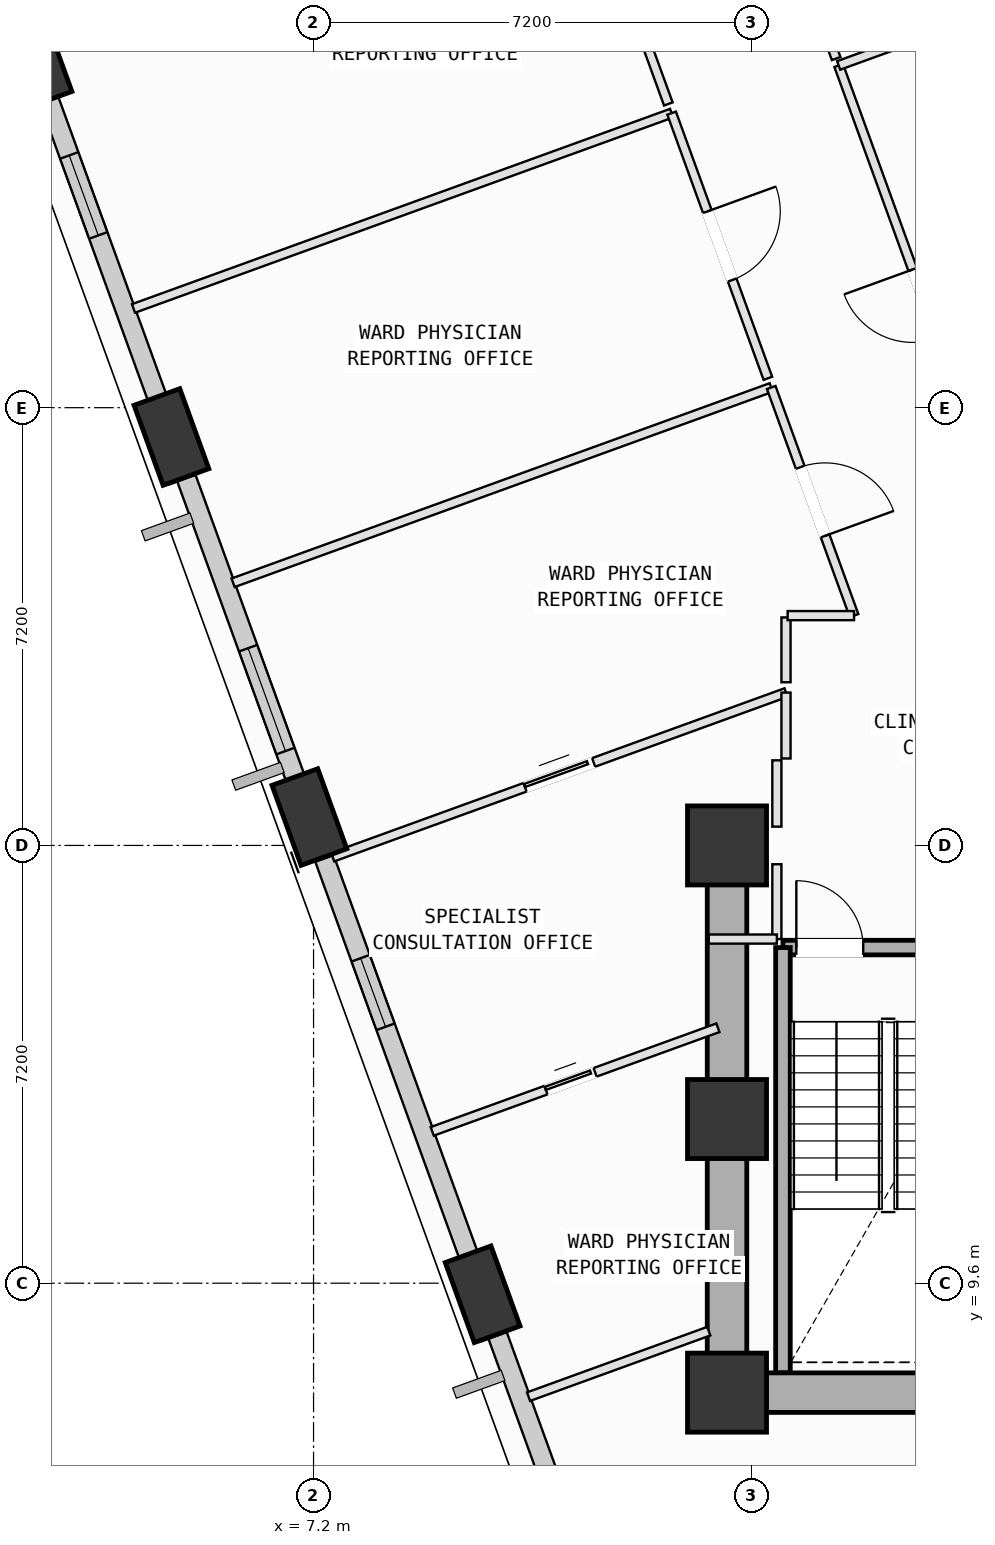
"""IFC4 building model, lengths in metres.
Left out: names, types, materials, properties, quantities, classifications, styles, units other than length and angle.
Written with IfcOpenShell. Run it as: python <this file> out.ifc"""

import sys

from ifc_helpers import new_model, si_unit, direction, frame, frame_2d, origin, origin_2d, place, context, subcontext, project, spatial, rectangle, extrude, element, fill, save


model = new_model("IFC4")
c1 = context("Model", 3, precision=1e-05, world=origin(), true_north=direction((0.0, 1.0)))
c2 = subcontext(c1, "Body", "Model", "MODEL_VIEW")
j1 = project(units=[si_unit("LENGTHUNIT", "METRE"), si_unit("PLANEANGLEUNIT", "RADIAN")], contexts=[c1])
p1 = place(None, origin())
s1 = spatial("IfcSite", under=j1, at=p1, CompositionType="ELEMENT")
p2 = place(p1, origin())
s2 = spatial("IfcBuilding", under=s1, at=p2, CompositionType="ELEMENT")
p3 = place(p2, frame((0.0, 0.0, 108.4)))
s3 = spatial("IfcBuildingStorey", under=s2, at=p3, CompositionType="ELEMENT", Elevation=108.4)
for number, where, z_axis, x_axis in (
    (1, (14.0, 7.8, 0.0), (0.0, 0.0, 1.0), (1.0, 0.0, 0.0)),
    (2, (14.0, 12.3, 0.0), (0.0, 0.0, 1.0), (1.0, 0.0, 0.0)),
    (3, (14.0, 16.8, 0.0), (0.0, 0.0, 1.0), (1.0, 0.0, 0.0)),
):
    element("IfcColumn", number, at=place(p3, frame(where, z_axis=z_axis, x_axis=x_axis)), inside=s3, PredefinedType="COLUMN", context=c2, shape_type="SweptSolid", body=[
        extrude(rectangle(XDim=1.3, YDim=1.3, at=origin_2d()), origin(), (0.0, 0.0, 1.0), 4.0),
    ])
p4 = place(p3, frame((2.611, 29.722, 0.002), z_axis=(-0.019204163449, -0.127522915018, 0.991649689281), x_axis=(-0.198586028496, 0.972557875578, 0.12122197795)))
e4 = element("IfcColumn", 4, at=p4, inside=s3, PredefinedType="COLUMN", context=c2, shape_type="SweptSolid", body=[
    extrude(rectangle(XDim=1.4, YDim=0.8, at=origin_2d()), origin(), (0.0, 0.0, 1.0), 4.03),
])
p5 = place(p3, frame((4.863, 23.518, 0.002), z_axis=(0.006248125651, -0.11822909605, 0.992966687142), x_axis=(-0.389982649693, 0.914072325457, 0.111289338092)))
e5 = element("IfcColumn", 5, at=p5, inside=s3, PredefinedType="COLUMN", context=c2, shape_type="SweptSolid", body=[
    extrude(rectangle(XDim=1.4, YDim=0.8, at=origin_2d()), origin(), (0.0, 0.0, 1.0), 4.025),
])
p6 = place(p3, frame((7.132, 17.267, 0.002), z_axis=(0.031926781496, -0.108769567377, 0.993554156469), x_axis=(-0.590424509034, 0.800027962606, 0.106555892281)))
e6 = element("IfcColumn", 6, at=p6, inside=s3, PredefinedType="COLUMN", context=c2, shape_type="SweptSolid", body=[
    extrude(rectangle(XDim=1.4, YDim=0.8, at=origin_2d()), origin(), (0.0, 0.0, 1.0), 4.022),
])
p7 = place(p3, frame((9.981, 9.418, 0.002), z_axis=(0.064136950794, -0.096721191642, 0.993242902129), x_axis=(-0.800334435141, 0.589545780228, 0.109089710528)))
e7 = element("IfcColumn", 7, at=p7, inside=s3, PredefinedType="COLUMN", context=c2, shape_type="SweptSolid", body=[
    extrude(rectangle(XDim=1.4, YDim=0.8, at=origin_2d()), origin(), (0.0, 0.0, 1.0), 4.023),
])
p8 = place(p3, frame((4.773, 23.765, 0.0), z_axis=(0.0, 0.0, 1.0), x_axis=(-0.341234474443, 0.93997820903, 0.0)))
e8 = element("IfcWall", 8, at=p8, inside=s3, PredefinedType="SOLIDWALL", context=c2, shape_type="SweptSolid", body=[
    extrude(rectangle(XDim=5.628, YDim=0.32, at=frame_2d((2.814, 0.0))), origin(), (0.0, 0.0, 1.0), 3.165),
])
p9 = place(p8, frame((3.263, 0.0, 0.75)))
e9 = element("IfcOpeningElement", 9, at=p9, cuts=e8, PredefinedType="OPENING", context=c2, shape_type="SweptSolid", body=[
    extrude(rectangle(XDim=1.4, YDim=1.85, at=frame_2d((0.7, 0.925))), frame((0.0, 0.17, 0.0), z_axis=(0.0, -1.0, 0.0), x_axis=(1.0, 0.0, 0.0)), (0.0, 0.0, 1.0), 0.34),
])
p10 = place(p3, frame((7.04, 17.519, 0.0), z_axis=(0.0, 0.0, 1.0), x_axis=(-0.341185627891, 0.939995940055, 0.0)))
e10 = element("IfcWall", 10, at=p10, inside=s3, PredefinedType="SOLIDWALL", context=c2, shape_type="SweptSolid", body=[
    extrude(rectangle(XDim=5.662, YDim=0.32, at=frame_2d((2.831, 0.0))), origin(), (0.0, 0.0, 1.0), 3.165),
])
p11 = place(p10, frame((0.886, 0.0, 0.75)))
e11 = element("IfcOpeningElement", 11, at=p11, cuts=e10, PredefinedType="OPENING", context=c2, shape_type="SweptSolid", body=[
    extrude(rectangle(XDim=1.8, YDim=2.05, at=frame_2d((0.9, 1.025))), frame((0.0, 0.17, 0.0), z_axis=(0.0, -1.0, 0.0), x_axis=(1.0, 0.0, 0.0)), (0.0, 0.0, 1.0), 0.34),
])
p12 = place(p3, frame((9.89, 9.668, 0.0), z_axis=(0.0, 0.0, 1.0), x_axis=(-0.341183717547, 0.939996633441, 0.0)))
e12 = element("IfcWall", 12, at=p12, inside=s3, PredefinedType="SOLIDWALL", context=c2, shape_type="SweptSolid", body=[
    extrude(rectangle(XDim=7.36, YDim=0.32, at=frame_2d((3.68, 0.0))), origin(), (0.0, 0.0, 1.0), 3.165),
])
p13 = place(p12, frame((4.414, 0.0, 0.75)))
e13 = element("IfcOpeningElement", 13, at=p13, cuts=e12, PredefinedType="OPENING", context=c2, shape_type="SweptSolid", body=[
    extrude(rectangle(XDim=1.2, YDim=1.75, at=frame_2d((0.6, 0.875))), frame((0.0, 0.17, 0.0), z_axis=(0.0, -1.0, 0.0), x_axis=(1.0, 0.0, 0.0)), (0.0, 0.0, 1.0), 0.34),
])
p14 = place(p3, frame((12.35, 2.891, 0.0), z_axis=(0.0, 0.0, 1.0), x_axis=(-0.341172894035, 0.940000561902, 0.0)))
e14 = element("IfcWall", 14, at=p14, inside=s3, PredefinedType="SOLIDWALL", context=c2, shape_type="SweptSolid", body=[
    extrude(rectangle(XDim=6.223, YDim=0.32, at=frame_2d((3.112, 0.0))), origin(), (0.0, 0.0, 1.0), 3.165),
])
p15 = place(p14, frame((1.65, 0.0, 0.75)))
e15 = element("IfcOpeningElement", 15, at=p15, cuts=e14, PredefinedType="OPENING", context=c2, shape_type="SweptSolid", body=[
    extrude(rectangle(XDim=1.6, YDim=1.95, at=frame_2d((0.8, 0.975))), frame((0.0, 0.17, 0.0), z_axis=(0.0, -1.0, 0.0), x_axis=(1.0, 0.0, 0.0)), (0.0, 0.0, 1.0), 0.34),
])
p16 = place(p3, frame((14.92, 15.12, 0.0), z_axis=(0.0, 0.0, 1.0), x_axis=(1.0, 0.0, 0.0)))
e16 = element("IfcWall", 16, at=p16, inside=s3, PredefinedType="SOLIDWALL", context=c2, shape_type="SweptSolid", body=[
    extrude(rectangle(XDim=3.46, YDim=0.24, at=frame_2d((1.73, 0.0))), origin(), (0.0, 0.0, 1.0), 3.78),
])
p17 = place(p16, frame((0.22, 0.0, 0.0)))
e17 = element("IfcOpeningElement", 17, at=p17, cuts=e16, PredefinedType="OPENING", context=c2, shape_type="SweptSolid", body=[
    extrude(rectangle(XDim=1.1, YDim=2.15, at=frame_2d((0.55, 1.075))), frame((0.0, 0.13, 0.0), z_axis=(0.0, -1.0, 0.0), x_axis=(1.0, 0.0, 0.0)), (0.0, 0.0, 1.0), 0.26),
])
p18 = place(p3, frame((14.92, 8.125, 0.0), z_axis=(0.0, 0.0, 1.0), x_axis=(0.0, 1.0, 0.0)))
e18 = element("IfcWall", 18, at=p18, inside=s3, PredefinedType="SOLIDWALL", context=c2, shape_type="SweptSolid", body=[
    extrude(rectangle(XDim=6.995, YDim=0.24, at=frame_2d((3.498, 0.0))), origin(), (0.0, 0.0, 1.0), 3.78),
])
p19 = place(p3, frame((14.0, 7.8, 0.0), z_axis=(0.0, 0.0, 1.0), x_axis=(1.0, 0.0, 0.0)))
e19 = element("IfcWall", 19, at=p19, inside=s3, PredefinedType="SHEAR", context=c2, shape_type="SweptSolid", body=[
    extrude(rectangle(XDim=10.8, YDim=0.65, at=frame_2d((5.4, 0.0))), origin(), (0.0, 0.0, 1.0), 3.78),
])
p20 = place(p3, frame((14.0, 16.8, 0.0), z_axis=(0.0, 0.0, 1.0), x_axis=(0.0, -1.0, 0.0)))
e20 = element("IfcWall", 20, at=p20, inside=s3, PredefinedType="SHEAR", context=c2, shape_type="SweptSolid", body=[
    extrude(rectangle(XDim=9.0, YDim=0.65, at=frame_2d((4.5, 0.0))), origin(), (0.0, 0.0, 1.0), 3.78),
])
p21 = place(p3, frame((10.011, 8.663, 0.0), z_axis=(0.0, 0.0, 1.0), x_axis=(-0.341584064238, 0.939851226024, 0.0)))
e21 = element("IfcWall", 21, at=p21, inside=s3, PredefinedType="PARTITIONING", context=c2, shape_type="SweptSolid", body=[
    extrude(rectangle(XDim=0.986, YDim=0.15, at=frame_2d((0.493, 0.0))), origin(), (0.0, 0.0, 1.0), 3.165),
])
p22 = place(p3, frame((9.152, 12.097, 0.0), z_axis=(0.0, 0.0, 1.0), x_axis=(0.940066980514, 0.340989841708, 0.0)))
e22 = element("IfcWall", 22, at=p22, inside=s3, PredefinedType="PARTITIONING", context=c2, shape_type="SweptSolid", body=[
    extrude(rectangle(XDim=4.998, YDim=0.15, at=frame_2d((2.499, 0.0))), origin(), (0.0, 0.0, 1.0), 3.78),
])
p23 = place(p22, frame((1.989, 0.0, 0.0)))
e23 = element("IfcOpeningElement", 23, at=p23, cuts=e22, PredefinedType="OPENING", context=c2, shape_type="SweptSolid", body=[
    extrude(rectangle(XDim=0.86, YDim=2.06, at=frame_2d((0.43, 1.03))), frame((0.0, 0.085, 0.0), z_axis=(0.0, -1.0, 0.0), x_axis=(1.0, 0.0, 0.0)), (0.0, 0.0, 1.0), 0.17),
])
p24 = place(p3, frame((13.7, 8.811, 0.0), z_axis=(0.0, 0.0, 1.0), x_axis=(-0.939856698146, -0.341569007596, 0.0)))
e24 = element("IfcWall", 24, at=p24, inside=s3, PredefinedType="PARTITIONING", context=c2, shape_type="SweptSolid", body=[
    extrude(rectangle(XDim=3.154, YDim=0.15, at=frame_2d((1.577, 0.0))), origin(), (0.0, 0.0, 1.0), 3.78),
])
p25 = place(p3, frame((14.82, 18.2, 0.0), z_axis=(0.0, 0.0, 1.0), x_axis=(0.0, -1.0, 0.0)))
e25 = element("IfcWall", 25, at=p25, inside=s3, PredefinedType="PARTITIONING", context=c2, shape_type="SweptSolid", body=[
    extrude(rectangle(XDim=1.091, YDim=0.15, at=frame_2d((0.545, 0.0))), origin(), (0.0, 0.0, 1.0), 3.78),
])
p26 = place(p3, frame((14.82, 16.491, 0.0), z_axis=(0.0, 0.0, 1.0), x_axis=(0.0, -1.0, 0.0)))
e26 = element("IfcWall", 26, at=p26, inside=s3, PredefinedType="PARTITIONING", context=c2, shape_type="SweptSolid", body=[
    extrude(rectangle(XDim=1.231, YDim=0.15, at=frame_2d((0.615, 0.0))), origin(), (0.0, 0.0, 1.0), 3.78),
])
p27 = place(p3, frame((14.82, 15.26, 0.0), z_axis=(0.0, 0.0, 1.0), x_axis=(-1.0, 0.0, 0.0)))
e27 = element("IfcWall", 27, at=p27, inside=s3, PredefinedType="PARTITIONING", context=c2, shape_type="SweptSolid", body=[
    extrude(rectangle(XDim=1.12, YDim=0.15, at=frame_2d((0.56, 0.0))), origin(), (0.0, 0.0, 1.0), 3.78),
])
p28 = place(p3, frame((7.515, 16.608, 0.0), z_axis=(0.0, 0.0, 1.0), x_axis=(0.939990996675, 0.341199247025, 0.0)))
e28 = element("IfcWall", 28, at=p28, inside=s3, PredefinedType="PARTITIONING", context=c2, shape_type="SweptSolid", body=[
    extrude(rectangle(XDim=7.931, YDim=0.15, at=frame_2d((3.965, 0.0))), origin(), (0.0, 0.0, 1.0), 3.78),
])
p29 = place(p28, frame((3.365, 0.0, 0.0)))
e29 = element("IfcOpeningElement", 29, at=p29, cuts=e28, PredefinedType="OPENING", context=c2, shape_type="SweptSolid", body=[
    extrude(rectangle(XDim=1.2, YDim=2.15, at=frame_2d((0.6, 1.075))), frame((0.0, 0.085, 0.0), z_axis=(0.0, -1.0, 0.0), x_axis=(1.0, 0.0, 0.0)), (0.0, 0.0, 1.0), 0.17),
])
p30 = place(p3, frame((14.97, 19.314, 0.0), z_axis=(0.0, 0.0, 1.0), x_axis=(0.0, -1.0, 0.0)))
e30 = element("IfcWall", 30, at=p30, inside=s3, PredefinedType="PARTITIONING", context=c2, shape_type="SweptSolid", body=[
    extrude(rectangle(XDim=1.084, YDim=0.15, at=frame_2d((0.542, 0.0))), origin(), (0.0, 0.0, 1.0), 3.78),
])
p31 = place(p3, frame((14.97, 20.55, 0.0), z_axis=(0.0, 0.0, 1.0), x_axis=(0.0, -1.0, 0.0)))
e31 = element("IfcWall", 31, at=p31, inside=s3, PredefinedType="PARTITIONING", context=c2, shape_type="SweptSolid", body=[
    extrude(rectangle(XDim=1.066, YDim=0.15, at=frame_2d((0.533, 0.0))), origin(), (0.0, 0.0, 1.0), 3.78),
])
p32 = place(p3, frame((7.117, 16.634, 0.0), z_axis=(0.0, 0.0, 1.0), x_axis=(-0.341286313554, 0.93995938858, 0.0)))
e32 = element("IfcWall", 32, at=p32, inside=s3, PredefinedType="PARTITIONING", context=c2, shape_type="SweptSolid", body=[
    extrude(rectangle(XDim=0.858, YDim=0.15, at=frame_2d((0.429, 0.0))), origin(), (0.0, 0.0, 1.0), 3.165),
])
p33 = place(p3, frame((5.877, 21.12, 0.0), z_axis=(0.0, 0.0, 1.0), x_axis=(0.940008258736, 0.34115168695, 0.0)))
e33 = element("IfcWall", 33, at=p33, inside=s3, PredefinedType="PARTITIONING", context=c2, shape_type="SweptSolid", body=[
    extrude(rectangle(XDim=9.415, YDim=0.15, at=frame_2d((4.708, 0.0))), origin(), (0.0, 0.0, 1.0), 3.78),
])
p34 = place(p3, frame((14.727, 24.332, 0.0), z_axis=(0.0, 0.0, 1.0), x_axis=(0.341237178064, -0.939977227547, 0.0)))
e34 = element("IfcWall", 34, at=p34, inside=s3, PredefinedType="PARTITIONING", context=c2, shape_type="SweptSolid", body=[
    extrude(rectangle(XDim=3.991, YDim=0.15, at=frame_2d((1.996, 0.0))), origin(), (0.0, 0.0, 1.0), 3.78),
])
p35 = place(p34, frame((1.396, 0.0, 0.0)))
e35 = element("IfcOpeningElement", 35, at=p35, cuts=e34, PredefinedType="OPENING", context=c2, shape_type="SweptSolid", body=[
    extrude(rectangle(XDim=1.2, YDim=2.15, at=frame_2d((0.6, 1.075))), frame((0.0, 0.085, 0.0), z_axis=(0.0, -1.0, 0.0), x_axis=(1.0, 0.0, 0.0)), (0.0, 0.0, 1.0), 0.17),
])
p36 = place(p3, frame((16.089, 20.58, 0.0), z_axis=(0.0, 0.0, 1.0), x_axis=(-1.0, 0.0, 0.0)))
e36 = element("IfcWall", 36, at=p36, inside=s3, PredefinedType="PARTITIONING", context=c2, shape_type="SweptSolid", body=[
    extrude(rectangle(XDim=1.092, YDim=0.15, at=frame_2d((0.546, 0.0))), origin(), (0.0, 0.0, 1.0), 3.78),
])
p37 = place(p3, frame((4.239, 25.632, 0.0), z_axis=(0.0, 0.0, 1.0), x_axis=(0.940008258736, 0.34115168695, 0.0)))
e37 = element("IfcWall", 37, at=p37, inside=s3, PredefinedType="PARTITIONING", context=c2, shape_type="SweptSolid", body=[
    extrude(rectangle(XDim=9.415, YDim=0.15, at=frame_2d((4.708, 0.0))), origin(), (0.0, 0.0, 1.0), 3.78),
])
p38 = place(p3, frame((13.089, 28.844, 0.0), z_axis=(0.0, 0.0, 1.0), x_axis=(0.34120218881, -0.939989928856, 0.0)))
e38 = element("IfcWall", 38, at=p38, inside=s3, PredefinedType="PARTITIONING", context=c2, shape_type="SweptSolid", body=[
    extrude(rectangle(XDim=4.639, YDim=0.15, at=frame_2d((2.32, 0.0))), origin(), (0.0, 0.0, 1.0), 3.78),
])
p39 = place(p38, frame((1.72, 0.0, 0.0)))
e39 = element("IfcOpeningElement", 39, at=p39, cuts=e38, PredefinedType="OPENING", context=c2, shape_type="SweptSolid", body=[
    extrude(rectangle(XDim=1.2, YDim=2.15, at=frame_2d((0.6, 1.075))), frame((0.0, 0.085, 0.0), z_axis=(0.0, -1.0, 0.0), x_axis=(1.0, 0.0, 0.0)), (0.0, 0.0, 1.0), 0.17),
])
p40 = place(p3, frame((4.892, 22.763, 0.0), z_axis=(0.0, 0.0, 1.0), x_axis=(-0.34100511436, 0.940061440535, 0.0)))
e40 = element("IfcWall", 40, at=p40, inside=s3, PredefinedType="PARTITIONING", context=c2, shape_type="SweptSolid", body=[
    extrude(rectangle(XDim=0.983, YDim=0.15, at=frame_2d((0.491, 0.0))), origin(), (0.0, 0.0, 1.0), 3.165),
])
p41 = place(p3, frame((11.451, 33.356, 0.0), z_axis=(0.0, 0.0, 1.0), x_axis=(0.341405037491, -0.939916273067, 0.0)))
e41 = element("IfcWall", 41, at=p41, inside=s3, PredefinedType="PARTITIONING", context=c2, shape_type="SweptSolid", body=[
    extrude(rectangle(XDim=4.64, YDim=0.15, at=frame_2d((2.32, 0.0))), origin(), (0.0, 0.0, 1.0), 2.965),
])
p42 = place(p41, frame((1.72, 0.0, 0.0)))
e42 = element("IfcOpeningElement", 42, at=p42, cuts=e41, PredefinedType="OPENING", context=c2, shape_type="SweptSolid", body=[
    extrude(rectangle(XDim=1.2, YDim=2.15, at=frame_2d((0.6, 1.075))), frame((0.0, 0.085, 0.0), z_axis=(0.0, -1.0, 0.0), x_axis=(1.0, 0.0, 0.0)), (0.0, 0.0, 1.0), 0.17),
])
p43 = place(p3, frame((18.682, 21.789, 0.0), z_axis=(0.0, 0.0, 1.0), x_axis=(-0.341223593307, 0.93998215907, 0.0)))
e43 = element("IfcWall", 43, at=p43, inside=s3, PredefinedType="PARTITIONING", context=c2, shape_type="SweptSolid", body=[
    extrude(rectangle(XDim=8.34, YDim=0.15, at=frame_2d((4.17, 0.0))), origin(), (0.0, 0.0, 1.0), 3.78),
])
p44 = place(p43, frame((3.57, 0.0, 0.0)))
e44 = element("IfcOpeningElement", 44, at=p44, cuts=e43, PredefinedType="OPENING", context=c2, shape_type="SweptSolid", body=[
    extrude(rectangle(XDim=1.2, YDim=2.15, at=frame_2d((0.6, 1.075))), frame((0.0, 0.085, 0.0), z_axis=(0.0, -1.0, 0.0), x_axis=(1.0, 0.0, 0.0)), (0.0, 0.0, 1.0), 0.17),
])
p45 = place(p3, frame((15.836, 29.629, 0.0), z_axis=(0.0, 0.0, 1.0), x_axis=(0.939996069291, 0.341185271836, 0.0)))
e45 = element("IfcWall", 45, at=p45, inside=s3, PredefinedType="PARTITIONING", context=c2, shape_type="SweptSolid", body=[
    extrude(rectangle(XDim=8.365, YDim=0.15, at=frame_2d((4.183, 0.0))), origin(), (0.0, 0.0, 1.0), 3.78),
])
p46 = place(p3, frame((15.795, 29.742, 0.0), z_axis=(0.0, 0.0, 1.0), x_axis=(-0.341080711776, 0.940034014307, 0.0)))
e46 = element("IfcWall", 46, at=p46, inside=s3, PredefinedType="PARTITIONING", context=c2, shape_type="SweptSolid", body=[
    extrude(rectangle(XDim=7.4, YDim=0.15, at=frame_2d((3.7, 0.0))), origin(), (0.0, 0.0, 1.0), 3.78),
])
p47 = place(p46, frame((3.24, 0.0, 0.0)))
e47 = element("IfcOpeningElement", 47, at=p47, cuts=e46, PredefinedType="OPENING", context=c2, shape_type="SweptSolid", body=[
    extrude(rectangle(XDim=0.92, YDim=2.1, at=frame_2d((0.46, 1.05))), frame((0.0, 0.085, 0.0), z_axis=(0.0, -1.0, 0.0), x_axis=(1.0, 0.0, 0.0)), (0.0, 0.0, 1.0), 0.17),
])
p48 = place(p9, origin())
e48 = element("IfcWindow", 48, at=p48, inside=s3, PartitioningType="SINGLE_PANEL", PredefinedType="WINDOW", context=c2, shape_type="SweptSolid", body=[
    extrude(rectangle(XDim=1.4, YDim=1.85, at=frame_2d((0.7, 0.925))), frame((0.0, 0.03, 0.0), z_axis=(0.0, -1.0, 0.0), x_axis=(1.0, 0.0, 0.0)), (0.0, 0.0, 1.0), 0.06),
])
fill(e9, e48)
p49 = place(p11, origin())
e49 = element("IfcWindow", 49, at=p49, inside=s3, PartitioningType="SINGLE_PANEL", PredefinedType="WINDOW", context=c2, shape_type="SweptSolid", body=[
    extrude(rectangle(XDim=1.8, YDim=2.05, at=frame_2d((0.9, 1.025))), frame((0.0, 0.03, 0.0), z_axis=(0.0, -1.0, 0.0), x_axis=(1.0, 0.0, 0.0)), (0.0, 0.0, 1.0), 0.06),
])
fill(e11, e49)
p50 = place(p13, origin())
e50 = element("IfcWindow", 50, at=p50, inside=s3, PartitioningType="SINGLE_PANEL", PredefinedType="WINDOW", context=c2, shape_type="SweptSolid", body=[
    extrude(rectangle(XDim=1.2, YDim=1.75, at=frame_2d((0.6, 0.875))), frame((0.0, 0.03, 0.0), z_axis=(0.0, -1.0, 0.0), x_axis=(1.0, 0.0, 0.0)), (0.0, 0.0, 1.0), 0.06),
])
fill(e13, e50)
p51 = place(p17, origin())
e51 = element("IfcDoor", 51, at=p51, inside=s3, OperationType="SINGLE_SWING_LEFT", PredefinedType="DOOR", context=c2, shape_type="SweptSolid", body=[
    extrude(rectangle(XDim=1.1, YDim=2.15, at=frame_2d((0.55, 1.075))), frame((0.0, 0.025, 0.0), z_axis=(0.0, -1.0, 0.0), x_axis=(1.0, 0.0, 0.0)), (0.0, 0.0, 1.0), 0.05),
])
fill(e17, e51)
p52 = place(p35, origin())
e52 = element("IfcDoor", 52, at=p52, inside=s3, OperationType="SINGLE_SWING_RIGHT", PredefinedType="DOOR", context=c2, shape_type="SweptSolid", body=[
    extrude(rectangle(XDim=1.2, YDim=2.15, at=frame_2d((0.6, 1.075))), frame((0.0, 0.025, 0.0), z_axis=(0.0, -1.0, 0.0), x_axis=(1.0, 0.0, 0.0)), (0.0, 0.0, 1.0), 0.05),
])
fill(e35, e52)
p53 = place(p39, origin())
e53 = element("IfcDoor", 53, at=p53, inside=s3, OperationType="SINGLE_SWING_LEFT", PredefinedType="DOOR", context=c2, shape_type="SweptSolid", body=[
    extrude(rectangle(XDim=1.2, YDim=2.15, at=frame_2d((0.6, 1.075))), frame((0.0, 0.025, 0.0), z_axis=(0.0, -1.0, 0.0), x_axis=(1.0, 0.0, 0.0)), (0.0, 0.0, 1.0), 0.05),
])
fill(e39, e53)
p54 = place(p44, origin())
e54 = element("IfcDoor", 54, at=p54, inside=s3, OperationType="SINGLE_SWING_RIGHT", PredefinedType="DOOR", context=c2, shape_type="SweptSolid", body=[
    extrude(rectangle(XDim=1.2, YDim=2.15, at=frame_2d((0.6, 1.075))), frame((0.0, 0.025, 0.0), z_axis=(0.0, -1.0, 0.0), x_axis=(1.0, 0.0, 0.0)), (0.0, 0.0, 1.0), 0.05),
])
fill(e44, e54)
p55 = place(p29, origin())
e55 = element("IfcDoor", 55, at=p55, inside=s3, OperationType="SLIDING_TO_LEFT", PredefinedType="DOOR", context=c2, shape_type="SweptSolid", body=[
    extrude(rectangle(XDim=1.2, YDim=2.15, at=frame_2d((0.6, 1.075))), frame((0.0, 0.025, 0.0), z_axis=(0.0, -1.0, 0.0), x_axis=(1.0, 0.0, 0.0)), (0.0, 0.0, 1.0), 0.05),
])
fill(e29, e55)
p56 = place(p23, origin())
e56 = element("IfcDoor", 56, at=p56, inside=s3, OperationType="SLIDING_TO_LEFT", PredefinedType="DOOR", context=c2, shape_type="SweptSolid", body=[
    extrude(rectangle(XDim=0.86, YDim=2.06, at=frame_2d((0.43, 1.03))), frame((0.0, 0.025, 0.0), z_axis=(0.0, -1.0, 0.0), x_axis=(1.0, 0.0, 0.0)), (0.0, 0.0, 1.0), 0.05),
])
fill(e23, e56)
save(model, sys.argv[1])
